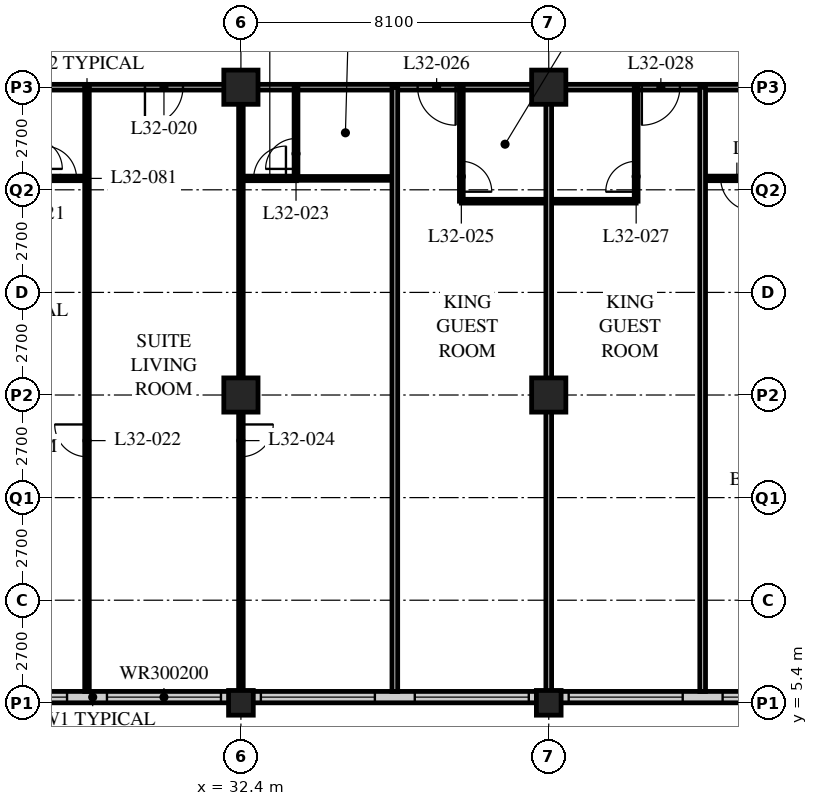
"""IFC4 building model, lengths in metres.
Left out: names, types, materials, properties, quantities, classifications, styles, units other than length and angle.
Written with IfcOpenShell. Run it as: python <this file> out.ifc"""

import sys

from ifc_helpers import new_model, si_unit, direction, frame, frame_2d, origin, origin_2d, place, context, subcontext, project, spatial, rectangle, hollow_rectangle, extrude, element, fill, save


model = new_model("IFC4")
c1 = context("Model", 3, precision=1e-05, world=origin(), true_north=direction((0.0, 1.0)))
c2 = subcontext(c1, "Body", "Model", "MODEL_VIEW")
j1 = project(units=[si_unit("LENGTHUNIT", "METRE"), si_unit("PLANEANGLEUNIT", "RADIAN")], contexts=[c1])
p1 = place(None, origin())
s1 = spatial("IfcSite", under=j1, at=p1, CompositionType="ELEMENT")
p2 = place(p1, origin())
s2 = spatial("IfcBuilding", under=s1, at=p2, CompositionType="ELEMENT")
p3 = place(p2, frame((0.0, 0.0, 127.2)))
s3 = spatial("IfcBuildingStorey", under=s2, at=p3, CompositionType="ELEMENT", Elevation=127.2)
p4 = place(p3, frame((32.4, 5.4, 0.0), z_axis=(0.0, 0.0, 1.0), x_axis=(1.0, 0.0, 0.0)))
e1 = element("IfcColumn", 1, at=p4, inside=s3, PredefinedType="COLUMN", context=c2, shape_type="SweptSolid", body=[
    extrude(hollow_rectangle(XDim=0.65, YDim=0.65, WallThickness=0.055, at=origin_2d()), origin(), (0.0, 0.0, 1.0), 3.4),
])
for number, where, z_axis, x_axis in (
    (2, (32.4, 13.5, 0.0), (0.0, 0.0, 1.0), (1.0, 0.0, 0.0)),
    (3, (32.4, 21.6, 0.0), (0.0, 0.0, 1.0), (1.0, 0.0, 0.0)),
):
    element("IfcColumn", number, at=place(p3, frame(where, z_axis=z_axis, x_axis=x_axis)), inside=s3, PredefinedType="COLUMN", context=c2, shape_type="SweptSolid", body=[
        extrude(hollow_rectangle(XDim=0.9, YDim=0.9, WallThickness=0.09, at=origin_2d()), origin(), (0.0, 0.0, 1.0), 3.4),
    ])
p5 = place(p3, frame((40.5, 5.4, 0.0), z_axis=(0.0, 0.0, 1.0), x_axis=(1.0, 0.0, 0.0)))
e4 = element("IfcColumn", 4, at=p5, inside=s3, PredefinedType="COLUMN", context=c2, shape_type="SweptSolid", body=[
    extrude(hollow_rectangle(XDim=0.65, YDim=0.65, WallThickness=0.055, at=origin_2d()), origin(), (0.0, 0.0, 1.0), 3.4),
])
for number, where, z_axis, x_axis in (
    (5, (40.5, 13.5, 0.0), (0.0, 0.0, 1.0), (1.0, 0.0, 0.0)),
    (6, (40.5, 21.6, 0.0), (0.0, 0.0, 1.0), (1.0, 0.0, 0.0)),
):
    element("IfcColumn", number, at=place(p3, frame(where, z_axis=z_axis, x_axis=x_axis)), inside=s3, PredefinedType="COLUMN", context=c2, shape_type="SweptSolid", body=[
        extrude(hollow_rectangle(XDim=0.9, YDim=0.9, WallThickness=0.09, at=origin_2d()), origin(), (0.0, 0.0, 1.0), 3.4),
    ])
p6 = place(p3, frame((8.4, 5.55, 0.0), z_axis=(0.0, 0.0, 1.0), x_axis=(1.0, 0.0, 0.0)))
e7 = element("IfcWall", 7, at=p6, inside=s3, PredefinedType="SOLIDWALL", context=c2, shape_type="SweptSolid", body=[
    extrude(rectangle(XDim=40.2, YDim=0.3, at=frame_2d((20.1, 0.0))), origin(), (0.0, 0.0, 1.0), 3.19),
])
p7 = place(p6, frame((0.225, 0.0, 0.9)))
e8 = element("IfcOpeningElement", 8, at=p7, cuts=e7, PredefinedType="OPENING", context=c2, shape_type="SweptSolid", body=[
    extrude(rectangle(XDim=3.0, YDim=2.0, at=frame_2d((1.5, 1.0))), frame((0.0, 0.16, 0.0), z_axis=(0.0, -1.0, 0.0), x_axis=(1.0, 0.0, 0.0)), (0.0, 0.0, 1.0), 0.32),
])
p8 = place(p6, frame((4.275, 0.0, 0.9)))
e9 = element("IfcOpeningElement", 9, at=p8, cuts=e7, PredefinedType="OPENING", context=c2, shape_type="SweptSolid", body=[
    extrude(rectangle(XDim=3.0, YDim=2.0, at=frame_2d((1.5, 1.0))), frame((0.0, 0.16, 0.0), z_axis=(0.0, -1.0, 0.0), x_axis=(1.0, 0.0, 0.0)), (0.0, 0.0, 1.0), 0.32),
])
p9 = place(p6, frame((8.325, 0.0, 0.9)))
e10 = element("IfcOpeningElement", 10, at=p9, cuts=e7, PredefinedType="OPENING", context=c2, shape_type="SweptSolid", body=[
    extrude(rectangle(XDim=3.0, YDim=2.0, at=frame_2d((1.5, 1.0))), frame((0.0, 0.16, 0.0), z_axis=(0.0, -1.0, 0.0), x_axis=(1.0, 0.0, 0.0)), (0.0, 0.0, 1.0), 0.32),
])
p10 = place(p6, frame((12.375, 0.0, 0.9)))
e11 = element("IfcOpeningElement", 11, at=p10, cuts=e7, PredefinedType="OPENING", context=c2, shape_type="SweptSolid", body=[
    extrude(rectangle(XDim=3.0, YDim=2.0, at=frame_2d((1.5, 1.0))), frame((0.0, 0.16, 0.0), z_axis=(0.0, -1.0, 0.0), x_axis=(1.0, 0.0, 0.0)), (0.0, 0.0, 1.0), 0.32),
])
p11 = place(p6, frame((16.425, 0.0, 0.9)))
e12 = element("IfcOpeningElement", 12, at=p11, cuts=e7, PredefinedType="OPENING", context=c2, shape_type="SweptSolid", body=[
    extrude(rectangle(XDim=3.0, YDim=2.0, at=frame_2d((1.5, 1.0))), frame((0.0, 0.16, 0.0), z_axis=(0.0, -1.0, 0.0), x_axis=(1.0, 0.0, 0.0)), (0.0, 0.0, 1.0), 0.32),
])
p12 = place(p6, frame((20.475, 0.0, 0.9)))
e13 = element("IfcOpeningElement", 13, at=p12, cuts=e7, PredefinedType="OPENING", context=c2, shape_type="SweptSolid", body=[
    extrude(rectangle(XDim=3.0, YDim=2.0, at=frame_2d((1.5, 1.0))), frame((0.0, 0.16, 0.0), z_axis=(0.0, -1.0, 0.0), x_axis=(1.0, 0.0, 0.0)), (0.0, 0.0, 1.0), 0.32),
])
p13 = place(p6, frame((24.525, 0.0, 0.9)))
e14 = element("IfcOpeningElement", 14, at=p13, cuts=e7, PredefinedType="OPENING", context=c2, shape_type="SweptSolid", body=[
    extrude(rectangle(XDim=3.0, YDim=2.0, at=frame_2d((1.5, 1.0))), frame((0.0, 0.16, 0.0), z_axis=(0.0, -1.0, 0.0), x_axis=(1.0, 0.0, 0.0)), (0.0, 0.0, 1.0), 0.32),
])
p14 = place(p6, frame((28.575, 0.0, 0.9)))
e15 = element("IfcOpeningElement", 15, at=p14, cuts=e7, PredefinedType="OPENING", context=c2, shape_type="SweptSolid", body=[
    extrude(rectangle(XDim=3.0, YDim=2.0, at=frame_2d((1.5, 1.0))), frame((0.0, 0.16, 0.0), z_axis=(0.0, -1.0, 0.0), x_axis=(1.0, 0.0, 0.0)), (0.0, 0.0, 1.0), 0.32),
])
p15 = place(p6, frame((32.625, 0.0, 0.9)))
e16 = element("IfcOpeningElement", 16, at=p15, cuts=e7, PredefinedType="OPENING", context=c2, shape_type="SweptSolid", body=[
    extrude(rectangle(XDim=3.0, YDim=2.0, at=frame_2d((1.5, 1.0))), frame((0.0, 0.16, 0.0), z_axis=(0.0, -1.0, 0.0), x_axis=(1.0, 0.0, 0.0)), (0.0, 0.0, 1.0), 0.32),
])
p16 = place(p6, frame((36.675, 0.0, 0.9)))
e17 = element("IfcOpeningElement", 17, at=p16, cuts=e7, PredefinedType="OPENING", context=c2, shape_type="SweptSolid", body=[
    extrude(rectangle(XDim=3.0, YDim=2.0, at=frame_2d((1.5, 1.0))), frame((0.0, 0.16, 0.0), z_axis=(0.0, -1.0, 0.0), x_axis=(1.0, 0.0, 0.0)), (0.0, 0.0, 1.0), 0.32),
])
p17 = place(p3, frame((8.1, 21.6, 0.0), z_axis=(0.0, 0.0, 1.0), x_axis=(1.0, 0.0, 0.0)))
e18 = element("IfcWall", 18, at=p17, inside=s3, PredefinedType="PARTITIONING", context=c2, shape_type="SweptSolid", body=[
    extrude(rectangle(XDim=40.5, YDim=0.15, at=frame_2d((20.25, 0.0))), origin(), (0.0, 0.0, 1.0), 2.578),
])
p18 = place(p17, frame((9.625, 0.0, 0.0)))
e19 = element("IfcOpeningElement", 19, at=p18, cuts=e18, PredefinedType="OPENING", context=c2, shape_type="SweptSolid", body=[
    extrude(rectangle(XDim=1.0, YDim=2.1, at=frame_2d((0.5, 1.05))), frame((0.0, 0.085, 0.0), z_axis=(0.0, -1.0, 0.0), x_axis=(1.0, 0.0, 0.0)), (0.0, 0.0, 1.0), 0.17),
])
p19 = place(p17, frame((21.775, 0.0, 0.0)))
e20 = element("IfcOpeningElement", 20, at=p19, cuts=e18, PredefinedType="OPENING", context=c2, shape_type="SweptSolid", body=[
    extrude(rectangle(XDim=1.0, YDim=2.1, at=frame_2d((0.5, 1.05))), frame((0.0, 0.085, 0.0), z_axis=(0.0, -1.0, 0.0), x_axis=(1.0, 0.0, 0.0)), (0.0, 0.0, 1.0), 0.17),
])
p20 = place(p17, frame((28.95, 0.0, 0.0)))
e21 = element("IfcOpeningElement", 21, at=p20, cuts=e18, PredefinedType="OPENING", context=c2, shape_type="SweptSolid", body=[
    extrude(rectangle(XDim=1.0, YDim=2.1, at=frame_2d((0.5, 1.05))), frame((0.0, 0.085, 0.0), z_axis=(0.0, -1.0, 0.0), x_axis=(1.0, 0.0, 0.0)), (0.0, 0.0, 1.0), 0.17),
])
p21 = place(p17, frame((34.85, 0.0, 0.0)))
e22 = element("IfcOpeningElement", 22, at=p21, cuts=e18, PredefinedType="OPENING", context=c2, shape_type="SweptSolid", body=[
    extrude(rectangle(XDim=1.0, YDim=2.1, at=frame_2d((0.5, 1.05))), frame((0.0, 0.085, 0.0), z_axis=(0.0, -1.0, 0.0), x_axis=(1.0, 0.0, 0.0)), (0.0, 0.0, 1.0), 0.17),
])
p22 = place(p17, frame((1.525, 0.0, 0.0)))
e23 = element("IfcOpeningElement", 23, at=p22, cuts=e18, PredefinedType="OPENING", context=c2, shape_type="SweptSolid", body=[
    extrude(rectangle(XDim=1.0, YDim=2.1, at=frame_2d((0.5, 1.05))), frame((0.0, 0.085, 0.0), z_axis=(0.0, -1.0, 0.0), x_axis=(1.0, 0.0, 0.0)), (0.0, 0.0, 1.0), 0.17),
])
p23 = place(p17, frame((37.975, 0.0, 0.0)))
e24 = element("IfcOpeningElement", 24, at=p23, cuts=e18, PredefinedType="OPENING", context=c2, shape_type="SweptSolid", body=[
    extrude(rectangle(XDim=1.0, YDim=2.1, at=frame_2d((0.5, 1.05))), frame((0.0, 0.085, 0.0), z_axis=(0.0, -1.0, 0.0), x_axis=(1.0, 0.0, 0.0)), (0.0, 0.0, 1.0), 0.17),
])
p24 = place(p3, frame((28.35, 21.6, 0.0), z_axis=(0.0, 0.0, 1.0), x_axis=(0.0, -1.0, 0.0)))
e25 = element("IfcWall", 25, at=p24, inside=s3, PredefinedType="PARTITIONING", context=c2, shape_type="SweptSolid", body=[
    extrude(rectangle(XDim=15.9, YDim=0.12, at=frame_2d((7.95, 0.0))), origin(), (0.0, 0.0, 1.0), 3.19),
])
p25 = place(p24, frame((8.875, 0.0, 0.0)))
e26 = element("IfcOpeningElement", 26, at=p25, cuts=e25, PredefinedType="OPENING", context=c2, shape_type="SweptSolid", body=[
    extrude(rectangle(XDim=0.85, YDim=2.1, at=frame_2d((0.425, 1.05))), frame((0.0, 0.07, 0.0), z_axis=(0.0, -1.0, 0.0), x_axis=(1.0, 0.0, 0.0)), (0.0, 0.0, 1.0), 0.14),
])
p26 = place(p3, frame((33.85, 19.2, 0.0), z_axis=(0.0, 0.0, 1.0), x_axis=(1.0, 0.0, 0.0)))
e27 = element("IfcWall", 27, at=p26, inside=s3, PredefinedType="PARTITIONING", context=c2, shape_type="SweptSolid", body=[
    extrude(rectangle(XDim=2.6, YDim=0.1, at=frame_2d((1.3, 0.0))), origin(), (0.0, 0.0, 1.0), 3.19),
])
p27 = place(p3, frame((33.85, 21.6, 0.0), z_axis=(0.0, 0.0, 1.0), x_axis=(0.0, -1.0, 0.0)))
e28 = element("IfcWall", 28, at=p27, inside=s3, PredefinedType="PARTITIONING", context=c2, shape_type="SweptSolid", body=[
    extrude(rectangle(XDim=2.4, YDim=0.1, at=frame_2d((1.2, 0.0))), origin(), (0.0, 0.0, 1.0), 3.19),
])
p28 = place(p27, frame((1.35, 0.0, 0.0)))
e29 = element("IfcOpeningElement", 29, at=p28, cuts=e28, PredefinedType="OPENING", context=c2, shape_type="SweptSolid", body=[
    extrude(rectangle(XDim=0.8, YDim=2.1, at=frame_2d((0.4, 1.05))), frame((0.0, 0.06, 0.0), z_axis=(0.0, -1.0, 0.0), x_axis=(1.0, 0.0, 0.0)), (0.0, 0.0, 1.0), 0.12),
])
p29 = place(p3, frame((32.4, 21.6, 0.0), z_axis=(0.0, 0.0, 1.0), x_axis=(0.0, -1.0, 0.0)))
e30 = element("IfcWall", 30, at=p29, inside=s3, PredefinedType="PARTITIONING", context=c2, shape_type="SweptSolid", body=[
    extrude(rectangle(XDim=15.9, YDim=0.12, at=frame_2d((7.95, 0.0))), origin(), (0.0, 0.0, 1.0), 2.578),
])
p30 = place(p29, frame((8.875, 0.0, 0.0)))
e31 = element("IfcOpeningElement", 31, at=p30, cuts=e30, PredefinedType="OPENING", context=c2, shape_type="SweptSolid", body=[
    extrude(rectangle(XDim=0.85, YDim=2.1, at=frame_2d((0.425, 1.05))), frame((0.0, 0.07, 0.0), z_axis=(0.0, -1.0, 0.0), x_axis=(1.0, 0.0, 0.0)), (0.0, 0.0, 1.0), 0.14),
])
p31 = place(p3, frame((36.45, 21.6, 0.0), z_axis=(0.0, 0.0, 1.0), x_axis=(0.0, -1.0, 0.0)))
e32 = element("IfcWall", 32, at=p31, inside=s3, PredefinedType="PARTITIONING", context=c2, shape_type="SweptSolid", body=[
    extrude(rectangle(XDim=15.9, YDim=0.15, at=frame_2d((7.95, 0.0))), origin(), (0.0, 0.0, 1.0), 3.19),
])
p32 = place(p3, frame((38.2, 18.6, 0.0), z_axis=(0.0, 0.0, 1.0), x_axis=(1.0, 0.0, 0.0)))
e33 = element("IfcWall", 33, at=p32, inside=s3, PredefinedType="PARTITIONING", context=c2, shape_type="SweptSolid", body=[
    extrude(rectangle(XDim=4.6, YDim=0.1, at=frame_2d((2.3, 0.0))), origin(), (0.0, 0.0, 1.0), 3.19),
])
p33 = place(p3, frame((38.2, 21.6, 0.0), z_axis=(0.0, 0.0, 1.0), x_axis=(0.0, -1.0, 0.0)))
e34 = element("IfcWall", 34, at=p33, inside=s3, PredefinedType="PARTITIONING", context=c2, shape_type="SweptSolid", body=[
    extrude(rectangle(XDim=3.0, YDim=0.1, at=frame_2d((1.5, 0.0))), origin(), (0.0, 0.0, 1.0), 3.19),
])
p34 = place(p33, frame((1.95, 0.0, 0.0)))
e35 = element("IfcOpeningElement", 35, at=p34, cuts=e34, PredefinedType="OPENING", context=c2, shape_type="SweptSolid", body=[
    extrude(rectangle(XDim=0.8, YDim=2.1, at=frame_2d((0.4, 1.05))), frame((0.0, 0.06, 0.0), z_axis=(0.0, -1.0, 0.0), x_axis=(1.0, 0.0, 0.0)), (0.0, 0.0, 1.0), 0.12),
])
p35 = place(p3, frame((40.5, 21.6, 0.0), z_axis=(0.0, 0.0, 1.0), x_axis=(0.0, -1.0, 0.0)))
e36 = element("IfcWall", 36, at=p35, inside=s3, PredefinedType="PARTITIONING", context=c2, shape_type="SweptSolid", body=[
    extrude(rectangle(XDim=15.9, YDim=0.15, at=frame_2d((7.95, 0.0))), origin(), (0.0, 0.0, 1.0), 2.578),
])
p36 = place(p3, frame((42.8, 21.6, 0.0), z_axis=(0.0, 0.0, 1.0), x_axis=(0.0, -1.0, 0.0)))
e37 = element("IfcWall", 37, at=p36, inside=s3, PredefinedType="PARTITIONING", context=c2, shape_type="SweptSolid", body=[
    extrude(rectangle(XDim=3.0, YDim=0.1, at=frame_2d((1.5, 0.0))), origin(), (0.0, 0.0, 1.0), 3.19),
])
p37 = place(p36, frame((1.95, 0.0, 0.0)))
e38 = element("IfcOpeningElement", 38, at=p37, cuts=e37, PredefinedType="OPENING", context=c2, shape_type="SweptSolid", body=[
    extrude(rectangle(XDim=0.8, YDim=2.1, at=frame_2d((0.4, 1.05))), frame((0.0, 0.06, 0.0), z_axis=(0.0, -1.0, 0.0), x_axis=(1.0, 0.0, 0.0)), (0.0, 0.0, 1.0), 0.12),
])
p38 = place(p3, frame((44.55, 19.2, 0.0), z_axis=(0.0, 0.0, 1.0), x_axis=(1.0, 0.0, 0.0)))
e39 = element("IfcWall", 39, at=p38, inside=s3, PredefinedType="PARTITIONING", context=c2, shape_type="SweptSolid", body=[
    extrude(rectangle(XDim=8.05, YDim=0.12, at=frame_2d((4.025, 0.0))), origin(), (0.0, 0.0, 1.0), 3.19),
])
p39 = place(p38, frame((0.475, 0.0, 0.0)))
e40 = element("IfcOpeningElement", 40, at=p39, cuts=e39, PredefinedType="OPENING", context=c2, shape_type="SweptSolid", body=[
    extrude(rectangle(XDim=0.85, YDim=2.1, at=frame_2d((0.425, 1.05))), frame((0.0, 0.07, 0.0), z_axis=(0.0, -1.0, 0.0), x_axis=(1.0, 0.0, 0.0)), (0.0, 0.0, 1.0), 0.14),
])
p40 = place(p38, frame((4.325, 0.0, 0.0)))
e41 = element("IfcOpeningElement", 41, at=p40, cuts=e39, PredefinedType="OPENING", context=c2, shape_type="SweptSolid", body=[
    extrude(rectangle(XDim=0.85, YDim=2.1, at=frame_2d((0.425, 1.05))), frame((0.0, 0.07, 0.0), z_axis=(0.0, -1.0, 0.0), x_axis=(1.0, 0.0, 0.0)), (0.0, 0.0, 1.0), 0.14),
])
p41 = place(p3, frame((44.55, 21.6, 0.0), z_axis=(0.0, 0.0, 1.0), x_axis=(0.0, -1.0, 0.0)))
e42 = element("IfcWall", 42, at=p41, inside=s3, PredefinedType="PARTITIONING", context=c2, shape_type="SweptSolid", body=[
    extrude(rectangle(XDim=15.9, YDim=0.15, at=frame_2d((7.95, 0.0))), origin(), (0.0, 0.0, 1.0), 3.19),
])
p42 = place(p3, frame((28.35, 19.2, 0.0), z_axis=(0.0, 0.0, 1.0), x_axis=(-1.0, 0.0, 0.0)))
e43 = element("IfcWall", 43, at=p42, inside=s3, PredefinedType="PARTITIONING", context=c2, shape_type="SweptSolid", body=[
    extrude(rectangle(XDim=1.46, YDim=0.12, at=frame_2d((0.73, 0.0))), origin(), (0.0, 0.0, 1.0), 3.19),
])
p43 = place(p42, frame((0.275, 0.0, 0.0)))
e44 = element("IfcOpeningElement", 44, at=p43, cuts=e43, PredefinedType="OPENING", context=c2, shape_type="SweptSolid", body=[
    extrude(rectangle(XDim=0.85, YDim=2.1, at=frame_2d((0.425, 1.05))), frame((0.0, 0.07, 0.0), z_axis=(0.0, -1.0, 0.0), x_axis=(1.0, 0.0, 0.0)), (0.0, 0.0, 1.0), 0.14),
])
p44 = place(p3, frame((33.86, 19.2, 0.0), z_axis=(0.0, 0.0, 1.0), x_axis=(-1.0, 0.0, 0.0)))
e45 = element("IfcWall", 45, at=p44, inside=s3, PredefinedType="PARTITIONING", context=c2, shape_type="SweptSolid", body=[
    extrude(rectangle(XDim=1.46, YDim=0.12, at=frame_2d((0.73, 0.0))), origin(), (0.0, 0.0, 1.0), 3.19),
])
p45 = place(p44, frame((0.275, 0.0, 0.0)))
e46 = element("IfcOpeningElement", 46, at=p45, cuts=e45, PredefinedType="OPENING", context=c2, shape_type="SweptSolid", body=[
    extrude(rectangle(XDim=0.85, YDim=2.1, at=frame_2d((0.425, 1.05))), frame((0.0, 0.07, 0.0), z_axis=(0.0, -1.0, 0.0), x_axis=(1.0, 0.0, 0.0)), (0.0, 0.0, 1.0), 0.14),
])
p46 = place(p11, origin())
e47 = element("IfcWindow", 47, at=p46, inside=s3, PartitioningType="SINGLE_PANEL", PredefinedType="WINDOW", context=c2, shape_type="SweptSolid", body=[
    extrude(rectangle(XDim=3.0, YDim=2.0, at=frame_2d((1.5, 1.0))), frame((0.0, 0.03, 0.0), z_axis=(0.0, -1.0, 0.0), x_axis=(1.0, 0.0, 0.0)), (0.0, 0.0, 1.0), 0.06),
])
fill(e12, e47)
p47 = place(p12, origin())
e48 = element("IfcWindow", 48, at=p47, inside=s3, PartitioningType="SINGLE_PANEL", PredefinedType="WINDOW", context=c2, shape_type="SweptSolid", body=[
    extrude(rectangle(XDim=3.0, YDim=2.0, at=frame_2d((1.5, 1.0))), frame((0.0, 0.03, 0.0), z_axis=(0.0, -1.0, 0.0), x_axis=(1.0, 0.0, 0.0)), (0.0, 0.0, 1.0), 0.06),
])
fill(e13, e48)
p48 = place(p13, origin())
e49 = element("IfcWindow", 49, at=p48, inside=s3, PartitioningType="SINGLE_PANEL", PredefinedType="WINDOW", context=c2, shape_type="SweptSolid", body=[
    extrude(rectangle(XDim=3.0, YDim=2.0, at=frame_2d((1.5, 1.0))), frame((0.0, 0.03, 0.0), z_axis=(0.0, -1.0, 0.0), x_axis=(1.0, 0.0, 0.0)), (0.0, 0.0, 1.0), 0.06),
])
fill(e14, e49)
p49 = place(p14, origin())
e50 = element("IfcWindow", 50, at=p49, inside=s3, PartitioningType="SINGLE_PANEL", PredefinedType="WINDOW", context=c2, shape_type="SweptSolid", body=[
    extrude(rectangle(XDim=3.0, YDim=2.0, at=frame_2d((1.5, 1.0))), frame((0.0, 0.03, 0.0), z_axis=(0.0, -1.0, 0.0), x_axis=(1.0, 0.0, 0.0)), (0.0, 0.0, 1.0), 0.06),
])
fill(e15, e50)
p50 = place(p15, origin())
e51 = element("IfcWindow", 51, at=p50, inside=s3, PartitioningType="SINGLE_PANEL", PredefinedType="WINDOW", context=c2, shape_type="SweptSolid", body=[
    extrude(rectangle(XDim=3.0, YDim=2.0, at=frame_2d((1.5, 1.0))), frame((0.0, 0.03, 0.0), z_axis=(0.0, -1.0, 0.0), x_axis=(1.0, 0.0, 0.0)), (0.0, 0.0, 1.0), 0.06),
])
fill(e16, e51)
p51 = place(p16, origin())
e52 = element("IfcWindow", 52, at=p51, inside=s3, PartitioningType="SINGLE_PANEL", PredefinedType="WINDOW", context=c2, shape_type="SweptSolid", body=[
    extrude(rectangle(XDim=3.0, YDim=2.0, at=frame_2d((1.5, 1.0))), frame((0.0, 0.03, 0.0), z_axis=(0.0, -1.0, 0.0), x_axis=(1.0, 0.0, 0.0)), (0.0, 0.0, 1.0), 0.06),
])
fill(e17, e52)
p52 = place(p19, origin())
e53 = element("IfcDoor", 53, at=p52, inside=s3, OperationType="SINGLE_SWING_RIGHT", PredefinedType="DOOR", context=c2, shape_type="SweptSolid", body=[
    extrude(rectangle(XDim=1.0, YDim=2.1, at=frame_2d((0.5, 1.05))), frame((0.0, 0.025, 0.0), z_axis=(0.0, -1.0, 0.0), x_axis=(1.0, 0.0, 0.0)), (0.0, 0.0, 1.0), 0.05),
])
fill(e20, e53)
p53 = place(p25, origin())
e54 = element("IfcDoor", 54, at=p53, inside=s3, OperationType="SINGLE_SWING_RIGHT", PredefinedType="DOOR", context=c2, shape_type="SweptSolid", body=[
    extrude(rectangle(XDim=0.85, YDim=2.1, at=frame_2d((0.425, 1.05))), frame((0.0, 0.025, 0.0), z_axis=(0.0, -1.0, 0.0), x_axis=(1.0, 0.0, 0.0)), (0.0, 0.0, 1.0), 0.05),
])
fill(e26, e54)
p54 = place(p28, origin())
e55 = element("IfcDoor", 55, at=p54, inside=s3, OperationType="SINGLE_SWING_LEFT", PredefinedType="DOOR", context=c2, shape_type="SweptSolid", body=[
    extrude(rectangle(XDim=0.8, YDim=2.1, at=frame_2d((0.4, 1.05))), frame((0.0, 0.025, 0.0), z_axis=(0.0, -1.0, 0.0), x_axis=(1.0, 0.0, 0.0)), (0.0, 0.0, 1.0), 0.05),
])
fill(e29, e55)
p55 = place(p30, origin())
e56 = element("IfcDoor", 56, at=p55, inside=s3, OperationType="SINGLE_SWING_LEFT", PredefinedType="DOOR", context=c2, shape_type="SweptSolid", body=[
    extrude(rectangle(XDim=0.85, YDim=2.1, at=frame_2d((0.425, 1.05))), frame((0.0, 0.025, 0.0), z_axis=(0.0, -1.0, 0.0), x_axis=(1.0, 0.0, 0.0)), (0.0, 0.0, 1.0), 0.05),
])
fill(e31, e56)
p56 = place(p34, origin())
e57 = element("IfcDoor", 57, at=p56, inside=s3, OperationType="SINGLE_SWING_RIGHT", PredefinedType="DOOR", context=c2, shape_type="SweptSolid", body=[
    extrude(rectangle(XDim=0.8, YDim=2.1, at=frame_2d((0.4, 1.05))), frame((0.0, 0.025, 0.0), z_axis=(0.0, -1.0, 0.0), x_axis=(1.0, 0.0, 0.0)), (0.0, 0.0, 1.0), 0.05),
])
fill(e35, e57)
p57 = place(p20, origin())
e58 = element("IfcDoor", 58, at=p57, inside=s3, OperationType="SINGLE_SWING_LEFT", PredefinedType="DOOR", context=c2, shape_type="SweptSolid", body=[
    extrude(rectangle(XDim=1.0, YDim=2.1, at=frame_2d((0.5, 1.05))), frame((0.0, 0.025, 0.0), z_axis=(0.0, -1.0, 0.0), x_axis=(1.0, 0.0, 0.0)), (0.0, 0.0, 1.0), 0.05),
])
fill(e21, e58)
p58 = place(p37, origin())
e59 = element("IfcDoor", 59, at=p58, inside=s3, OperationType="SINGLE_SWING_LEFT", PredefinedType="DOOR", context=c2, shape_type="SweptSolid", body=[
    extrude(rectangle(XDim=0.8, YDim=2.1, at=frame_2d((0.4, 1.05))), frame((0.0, 0.025, 0.0), z_axis=(0.0, -1.0, 0.0), x_axis=(1.0, 0.0, 0.0)), (0.0, 0.0, 1.0), 0.05),
])
fill(e38, e59)
p59 = place(p21, origin())
e60 = element("IfcDoor", 60, at=p59, inside=s3, OperationType="SINGLE_SWING_RIGHT", PredefinedType="DOOR", context=c2, shape_type="SweptSolid", body=[
    extrude(rectangle(XDim=1.0, YDim=2.1, at=frame_2d((0.5, 1.05))), frame((0.0, 0.025, 0.0), z_axis=(0.0, -1.0, 0.0), x_axis=(1.0, 0.0, 0.0)), (0.0, 0.0, 1.0), 0.05),
])
fill(e22, e60)
p60 = place(p39, origin())
e61 = element("IfcDoor", 61, at=p60, inside=s3, OperationType="SINGLE_SWING_LEFT", PredefinedType="DOOR", context=c2, shape_type="SweptSolid", body=[
    extrude(rectangle(XDim=0.85, YDim=2.1, at=frame_2d((0.425, 1.05))), frame((0.0, 0.025, 0.0), z_axis=(0.0, -1.0, 0.0), x_axis=(1.0, 0.0, 0.0)), (0.0, 0.0, 1.0), 0.05),
])
fill(e40, e61)
p61 = place(p43, origin())
e62 = element("IfcDoor", 62, at=p61, inside=s3, OperationType="SINGLE_SWING_LEFT", PredefinedType="DOOR", context=c2, shape_type="SweptSolid", body=[
    extrude(rectangle(XDim=0.85, YDim=2.1, at=frame_2d((0.425, 1.05))), frame((0.0, 0.025, 0.0), z_axis=(0.0, -1.0, 0.0), x_axis=(1.0, 0.0, 0.0)), (0.0, 0.0, 1.0), 0.05),
])
fill(e44, e62)
p62 = place(p45, origin())
e63 = element("IfcDoor", 63, at=p62, inside=s3, OperationType="SINGLE_SWING_RIGHT", PredefinedType="DOOR", context=c2, shape_type="SweptSolid", body=[
    extrude(rectangle(XDim=0.85, YDim=2.1, at=frame_2d((0.425, 1.05))), frame((0.0, 0.025, 0.0), z_axis=(0.0, -1.0, 0.0), x_axis=(1.0, 0.0, 0.0)), (0.0, 0.0, 1.0), 0.05),
])
fill(e46, e63)
save(model, sys.argv[1])
